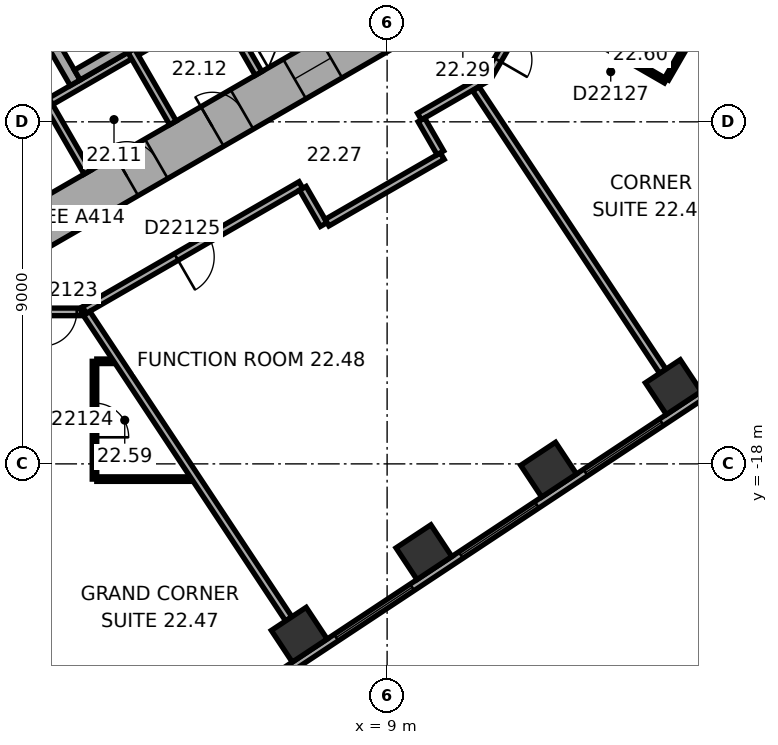
"""IFC4 building model, lengths in metres.
Left out: names, types, materials, properties, quantities, classifications, styles, units other than length and angle.
Written with IfcOpenShell. Run it as: python <this file> out.ifc"""

import sys

from ifc_helpers import new_model, si_unit, direction, frame, frame_2d, origin, origin_2d, place, context, subcontext, project, spatial, rectangle, extrude, element, fill, save


model = new_model("IFC4")
c1 = context("Model", 3, precision=1e-05, world=origin(), true_north=direction((0.0, 1.0)))
c2 = subcontext(c1, "Body", "Model", "MODEL_VIEW")
j1 = project(units=[si_unit("LENGTHUNIT", "METRE"), si_unit("PLANEANGLEUNIT", "RADIAN")], contexts=[c1])
p1 = place(None, origin())
s1 = spatial("IfcSite", under=j1, at=p1, CompositionType="ELEMENT")
p2 = place(p1, origin())
s2 = spatial("IfcBuilding", under=s1, at=p2, CompositionType="ELEMENT")
p3 = place(p2, frame((0.0, 0.0, 96.8)))
s3 = spatial("IfcBuildingStorey", under=s2, at=p3, CompositionType="ELEMENT", Elevation=96.8)
for number, where, z_axis, x_axis in (
    (1, (6.688, -22.496, 0.0), (0.0, 0.0, 1.0), (0.834, 0.552, 0.0)),
    (2, (9.969, -20.324, 0.0), (0.0, 0.0, 1.0), (0.834, 0.552, 0.0)),
    (3, (13.25, -18.152, 0.0), (0.0, 0.0, 1.0), (0.834, 0.552, 0.0)),
    (4, (16.531, -15.981, 0.0), (0.0, 0.0, 1.0), (0.834, 0.552, 0.0)),
):
    element("IfcColumn", number, at=place(p3, frame(where, z_axis=z_axis, x_axis=x_axis)), inside=s3, PredefinedType="COLUMN", context=c2, shape_type="SweptSolid", body=[
        extrude(rectangle(XDim=1.1, YDim=1.0, at=origin_2d()), origin(), (0.0, 0.0, 1.0), 3.3),
    ])
p4 = place(p3, frame((-10.4, -5.658, 0.0), z_axis=(0.0, 0.0, 1.0), x_axis=(0.866021384402, -0.500006961711, 0.0)))
e5 = element("IfcWall", 5, at=p4, inside=s3, PredefinedType="SHEAR", context=c2, shape_type="SweptSolid", body=[
    extrude(rectangle(XDim=12.355, YDim=1.2, at=frame_2d((6.178, 0.0))), origin(), (0.0, 0.0, 1.0), 3.3),
])
p5 = place(p4, frame((6.378, 0.0, 0.0)))
e6 = element("IfcOpeningElement", 6, at=p5, cuts=e5, PredefinedType="OPENING", context=c2, shape_type="SweptSolid", body=[
    extrude(rectangle(XDim=1.5, YDim=2.1, at=frame_2d((0.75, 1.05))), frame((0.0, 0.61, 0.0), z_axis=(0.0, -1.0, 0.0), x_axis=(1.0, 0.0, 0.0)), (0.0, 0.0, 1.0), 1.22),
])
p6 = place(p4, frame((3.228, 0.0, 0.0)))
e7 = element("IfcOpeningElement", 7, at=p6, cuts=e5, PredefinedType="OPENING", context=c2, shape_type="SweptSolid", body=[
    extrude(rectangle(XDim=0.9, YDim=2.1, at=frame_2d((0.45, 1.05))), frame((0.0, 0.61, 0.0), z_axis=(0.0, -1.0, 0.0), x_axis=(1.0, 0.0, 0.0)), (0.0, 0.0, 1.0), 1.22),
])
p7 = place(p3, frame((-0.3, -11.836, 0.0), z_axis=(0.0, 0.0, 1.0), x_axis=(0.866021384402, 0.500006961711, 0.0)))
e8 = element("IfcWall", 8, at=p7, inside=s3, PredefinedType="SHEAR", context=c2, shape_type="SweptSolid", body=[
    extrude(rectangle(XDim=12.355, YDim=1.2, at=frame_2d((6.178, 0.0))), origin(), (0.0, 0.0, 1.0), 3.3),
])
p8 = place(p7, frame((2.828, 0.0, 0.0)))
e9 = element("IfcOpeningElement", 9, at=p8, cuts=e8, PredefinedType="OPENING", context=c2, shape_type="SweptSolid", body=[
    extrude(rectangle(XDim=0.9, YDim=2.1, at=frame_2d((0.45, 1.05))), frame((0.0, 0.61, 0.0), z_axis=(0.0, -1.0, 0.0), x_axis=(1.0, 0.0, 0.0)), (0.0, 0.0, 1.0), 1.22),
])
p9 = place(p7, frame((5.428, 0.0, 0.0)))
e10 = element("IfcOpeningElement", 10, at=p9, cuts=e8, PredefinedType="OPENING", context=c2, shape_type="SweptSolid", body=[
    extrude(rectangle(XDim=0.9, YDim=2.1, at=frame_2d((0.45, 1.05))), frame((0.0, 0.61, 0.0), z_axis=(0.0, -1.0, 0.0), x_axis=(1.0, 0.0, 0.0)), (0.0, 0.0, 1.0), 1.22),
])
p10 = place(p7, frame((7.928, 0.0, 0.0)))
e11 = element("IfcOpeningElement", 11, at=p10, cuts=e8, PredefinedType="OPENING", context=c2, shape_type="SweptSolid", body=[
    extrude(rectangle(XDim=1.1, YDim=2.1, at=frame_2d((0.55, 1.05))), frame((0.0, 0.61, 0.0), z_axis=(0.0, -1.0, 0.0), x_axis=(1.0, 0.0, 0.0)), (0.0, 0.0, 1.0), 1.22),
])
p11 = place(p3, frame((3.083, -25.601, 0.0), z_axis=(0.0, 0.0, 1.0), x_axis=(0.833884295743, 0.551939291329, 0.0)))
e12 = element("IfcWall", 12, at=p11, inside=s3, PredefinedType="STANDARD", context=c2, shape_type="SweptSolid", body=[
    extrude(rectangle(XDim=21.246, YDim=0.2, at=frame_2d((10.623, 0.0))), origin(), (0.0, 0.0, 1.0), 3.3),
])
p12 = place(p11, frame((1.553, 0.0, 0.8)))
e13 = element("IfcOpeningElement", 13, at=p12, cuts=e12, PredefinedType="OPENING", context=c2, shape_type="SweptSolid", body=[
    extrude(rectangle(XDim=2.4, YDim=1.7, at=frame_2d((1.2, 0.85))), frame((0.0, 0.11, 0.0), z_axis=(0.0, -1.0, 0.0), x_axis=(1.0, 0.0, 0.0)), (0.0, 0.0, 1.0), 0.22),
])
p13 = place(p11, frame((5.488, 0.0, 0.8)))
e14 = element("IfcOpeningElement", 14, at=p13, cuts=e12, PredefinedType="OPENING", context=c2, shape_type="SweptSolid", body=[
    extrude(rectangle(XDim=2.4, YDim=1.7, at=frame_2d((1.2, 0.85))), frame((0.0, 0.11, 0.0), z_axis=(0.0, -1.0, 0.0), x_axis=(1.0, 0.0, 0.0)), (0.0, 0.0, 1.0), 0.22),
])
p14 = place(p11, frame((9.422, 0.0, 0.8)))
e15 = element("IfcOpeningElement", 15, at=p14, cuts=e12, PredefinedType="OPENING", context=c2, shape_type="SweptSolid", body=[
    extrude(rectangle(XDim=2.4, YDim=1.7, at=frame_2d((1.2, 0.85))), frame((0.0, 0.11, 0.0), z_axis=(0.0, -1.0, 0.0), x_axis=(1.0, 0.0, 0.0)), (0.0, 0.0, 1.0), 0.22),
])
p15 = place(p11, frame((13.357, 0.0, 0.8)))
e16 = element("IfcOpeningElement", 16, at=p15, cuts=e12, PredefinedType="OPENING", context=c2, shape_type="SweptSolid", body=[
    extrude(rectangle(XDim=2.4, YDim=1.7, at=frame_2d((1.2, 0.85))), frame((0.0, 0.11, 0.0), z_axis=(0.0, -1.0, 0.0), x_axis=(1.0, 0.0, 0.0)), (0.0, 0.0, 1.0), 0.22),
])
p16 = place(p11, frame((17.291, 0.0, 0.8)))
e17 = element("IfcOpeningElement", 17, at=p16, cuts=e12, PredefinedType="OPENING", context=c2, shape_type="SweptSolid", body=[
    extrude(rectangle(XDim=2.4, YDim=1.7, at=frame_2d((1.2, 0.85))), frame((0.0, 0.11, 0.0), z_axis=(0.0, -1.0, 0.0), x_axis=(1.0, 0.0, 0.0)), (0.0, 0.0, 1.0), 0.22),
])
p17 = place(p3, frame((-0.024, -8.559, 0.0), z_axis=(0.0, 0.0, 1.0), x_axis=(0.866026010844, 0.49999894854, 0.0)))
e18 = element("IfcWall", 18, at=p17, inside=s3, PredefinedType="PARTITIONING", context=c2, shape_type="SweptSolid", body=[
    extrude(rectangle(XDim=8.0, YDim=0.2, at=frame_2d((4.0, 0.0))), origin(), (0.0, 0.0, 1.0), 3.05),
])
for number, where, z_axis, x_axis in (
    (19, (0.013, -8.422, 0.0), (0.0, 0.0, 1.0), (0.5, -0.866, 0.0)),
    (20, (2.264, -7.122, 0.0), (0.0, 0.0, 1.0), (0.5, -0.866, 0.0)),
    (21, (4.516, -5.822, 0.0), (0.0, 0.0, 1.0), (0.5, -0.866, 0.0)),
):
    element("IfcWall", number, at=place(p3, frame(where, z_axis=z_axis, x_axis=x_axis)), inside=s3, PredefinedType="PARTITIONING", context=c2, shape_type="SweptSolid", body=[
        extrude(rectangle(XDim=2.2, YDim=0.2, at=frame_2d((1.1, 0.0))), origin(), (0.0, 0.0, 1.0), 3.05),
    ])
p18 = place(p3, frame((-1.558, -3.902, 0.0), z_axis=(0.0, 0.0, 1.0), x_axis=(0.499977259774, -0.866038532462, 0.0)))
e22 = element("IfcWall", 22, at=p18, inside=s3, PredefinedType="SHEAR", context=c2, shape_type="SweptSolid", body=[
    extrude(rectangle(XDim=4.7, YDim=0.3, at=frame_2d((2.35, 0.0))), origin(), (0.0, 0.0, 1.0), 3.05),
])
p19 = place(p18, frame((0.8, 0.0, 0.0)))
e23 = element("IfcOpeningElement", 23, at=p19, cuts=e22, PredefinedType="OPENING", context=c2, shape_type="SweptSolid", body=[
    extrude(rectangle(XDim=1.2, YDim=2.1, at=frame_2d((0.6, 1.05))), frame((0.0, 0.16, 0.0), z_axis=(0.0, -1.0, 0.0), x_axis=(1.0, 0.0, 0.0)), (0.0, 0.0, 1.0), 0.32),
])
p20 = place(p3, frame((0.847, -7.767, 0.0), z_axis=(0.0, 0.0, 1.0), x_axis=(0.866027801685, 0.499995846692, 0.0)))
e24 = element("IfcWall", 24, at=p20, inside=s3, PredefinedType="SHEAR", context=c2, shape_type="SweptSolid", body=[
    extrude(rectangle(XDim=7.06, YDim=0.3, at=frame_2d((3.53, 0.0))), origin(), (0.0, 0.0, 1.0), 3.05),
])
p21 = place(p3, frame((-0.91, -14.001, 0.0), z_axis=(0.0, 0.0, 1.0), x_axis=(1.0, 0.0, 0.0)))
e25 = element("IfcWall", 25, at=p21, inside=s3, PredefinedType="PARTITIONING", context=c2, shape_type="SweptSolid", body=[
    extrude(rectangle(XDim=1.86, YDim=0.2, at=frame_2d((0.93, 0.0))), origin(), (0.0, 0.0, 1.0), 3.05),
])
p22 = place(p21, frame((0.842, 0.0, 0.0)))
e26 = element("IfcOpeningElement", 26, at=p22, cuts=e25, PredefinedType="OPENING", context=c2, shape_type="SweptSolid", body=[
    extrude(rectangle(XDim=0.9, YDim=2.1, at=frame_2d((0.45, 1.05))), frame((0.0, 0.11, 0.0), z_axis=(0.0, -1.0, 0.0), x_axis=(1.0, 0.0, 0.0)), (0.0, 0.0, 1.0), 0.22),
])
p23 = place(p3, frame((1.033, -13.953, 0.0), z_axis=(0.0, 0.0, 1.0), x_axis=(0.866017531406, 0.500013635111, 0.0)))
e27 = element("IfcWall", 27, at=p23, inside=s3, PredefinedType="PARTITIONING", context=c2, shape_type="SweptSolid", body=[
    extrude(rectangle(XDim=6.58, YDim=0.2, at=frame_2d((3.29, 0.0))), origin(), (0.0, 0.0, 1.0), 3.05),
])
p24 = place(p23, frame((2.79, 0.0, 0.0)))
e28 = element("IfcOpeningElement", 28, at=p24, cuts=e27, PredefinedType="OPENING", context=c2, shape_type="SweptSolid", body=[
    extrude(rectangle(XDim=1.0, YDim=2.1, at=frame_2d((0.5, 1.05))), frame((0.0, 0.11, 0.0), z_axis=(0.0, -1.0, 0.0), x_axis=(1.0, 0.0, 0.0)), (0.0, 0.0, 1.0), 0.22),
])
p25 = place(p3, frame((1.3, -18.401, 0.0), z_axis=(0.0, 0.0, 1.0), x_axis=(0.0, 1.0, 0.0)))
e29 = element("IfcWall", 29, at=p25, inside=s3, PredefinedType="PARTITIONING", context=c2, shape_type="SweptSolid", body=[
    extrude(rectangle(XDim=3.1, YDim=0.12, at=frame_2d((1.55, 0.0))), origin(), (0.0, 0.0, 1.0), 3.05),
])
p26 = place(p25, frame((1.1, 0.0, 0.0)))
e30 = element("IfcOpeningElement", 30, at=p26, cuts=e29, PredefinedType="OPENING", context=c2, shape_type="SweptSolid", body=[
    extrude(rectangle(XDim=0.9, YDim=2.1, at=frame_2d((0.45, 1.05))), frame((0.0, 0.07, 0.0), z_axis=(0.0, -1.0, 0.0), x_axis=(1.0, 0.0, 0.0)), (0.0, 0.0, 1.0), 0.14),
])
p27 = place(p3, frame((1.36, -15.301, 0.0), z_axis=(0.0, 0.0, 1.0), x_axis=(1.0, 0.0, 0.0)))
e31 = element("IfcWall", 31, at=p27, inside=s3, PredefinedType="PARTITIONING", context=c2, shape_type="SweptSolid", body=[
    extrude(rectangle(XDim=0.416, YDim=0.12, at=frame_2d((0.208, 0.0))), origin(), (0.0, 0.0, 1.0), 3.05),
])
p28 = place(p3, frame((3.828, -18.401, 0.0), z_axis=(0.0, 0.0, 1.0), x_axis=(-1.0, 0.0, 0.0)))
e32 = element("IfcWall", 32, at=p28, inside=s3, PredefinedType="PARTITIONING", context=c2, shape_type="SweptSolid", body=[
    extrude(rectangle(XDim=2.468, YDim=0.12, at=frame_2d((1.234, 0.0))), origin(), (0.0, 0.0, 1.0), 3.05),
])
p29 = place(p3, frame((6.412, -22.079, 0.0), z_axis=(0.0, 0.0, 1.0), x_axis=(-0.551919507115, 0.83389739037, 0.0)))
e33 = element("IfcWall", 33, at=p29, inside=s3, PredefinedType="PARTITIONING", context=c2, shape_type="SweptSolid", body=[
    extrude(rectangle(XDim=9.635, YDim=0.2, at=frame_2d((4.817, 0.0))), origin(), (0.0, 0.0, 1.0), 3.05),
])
p30 = place(p3, frame((6.782, -10.749, 0.0), z_axis=(0.0, 0.0, 1.0), x_axis=(0.500074377092, -0.865982457891, 0.0)))
e34 = element("IfcWall", 34, at=p30, inside=s3, PredefinedType="PARTITIONING", context=c2, shape_type="SweptSolid", body=[
    extrude(rectangle(XDim=1.101, YDim=0.2, at=frame_2d((0.55, 0.0))), origin(), (0.0, 0.0, 1.0), 3.05),
])
p31 = place(p3, frame((7.419, -11.653, 0.0), z_axis=(0.0, 0.0, 1.0), x_axis=(0.866038154057, 0.49997791523, 0.0)))
e35 = element("IfcWall", 35, at=p31, inside=s3, PredefinedType="PARTITIONING", context=c2, shape_type="SweptSolid", body=[
    extrude(rectangle(XDim=3.502, YDim=0.2, at=frame_2d((1.751, 0.0))), origin(), (0.0, 0.0, 1.0), 3.05),
])
p32 = place(p3, frame((9.852, -8.861, 0.0), z_axis=(0.0, 0.0, 1.0), x_axis=(0.866013291437, 0.500020978615, 0.0)))
e36 = element("IfcWall", 36, at=p32, inside=s3, PredefinedType="PARTITIONING", context=c2, shape_type="SweptSolid", body=[
    extrude(rectangle(XDim=2.077, YDim=0.2, at=frame_2d((1.038, 0.0))), origin(), (0.0, 0.0, 1.0), 3.05),
])
p33 = place(p3, frame((10.402, -9.815, 0.0), z_axis=(0.0, 0.0, 1.0), x_axis=(-0.499968756647, 0.866043441391, 0.0)))
e37 = element("IfcWall", 37, at=p33, inside=s3, PredefinedType="PARTITIONING", context=c2, shape_type="SweptSolid", body=[
    extrude(rectangle(XDim=1.001, YDim=0.2, at=frame_2d((0.5, 0.0))), origin(), (0.0, 0.0, 1.0), 3.05),
])
p34 = place(p3, frame((11.67, -7.788, 0.0), z_axis=(0.0, 0.0, 1.0), x_axis=(0.500063286585, 0.865988862174, 0.0)))
e38 = element("IfcWall", 38, at=p34, inside=s3, PredefinedType="PARTITIONING", context=c2, shape_type="SweptSolid", body=[
    extrude(rectangle(XDim=1.86, YDim=0.2, at=frame_2d((0.93, 0.0))), origin(), (0.0, 0.0, 1.0), 3.05),
])
p35 = place(p34, frame((0.48, 0.0, 0.0)))
e39 = element("IfcOpeningElement", 39, at=p35, cuts=e38, PredefinedType="OPENING", context=c2, shape_type="SweptSolid", body=[
    extrude(rectangle(XDim=0.9, YDim=2.1, at=frame_2d((0.45, 1.05))), frame((0.0, 0.11, 0.0), z_axis=(0.0, -1.0, 0.0), x_axis=(1.0, 0.0, 0.0)), (0.0, 0.0, 1.0), 0.22),
])
p36 = place(p3, frame((16.255, -15.564, 0.0), z_axis=(0.0, 0.0, 1.0), x_axis=(-0.55192208744, 0.833895682562, 0.0)))
e40 = element("IfcWall", 40, at=p36, inside=s3, PredefinedType="PARTITIONING", context=c2, shape_type="SweptSolid", body=[
    extrude(rectangle(XDim=8.913, YDim=0.2, at=frame_2d((4.457, 0.0))), origin(), (0.0, 0.0, 1.0), 2.6),
])
p37 = place(p3, frame((16.326, -7.925, 0.0), z_axis=(0.0, 0.0, 1.0), x_axis=(-0.865997131366, 0.500048966069, 0.0)))
e41 = element("IfcWall", 41, at=p37, inside=s3, PredefinedType="PARTITIONING", context=c2, shape_type="SweptSolid", body=[
    extrude(rectangle(XDim=2.74, YDim=0.12, at=frame_2d((1.37, 0.0))), origin(), (0.0, 0.0, 1.0), 3.05),
])
p38 = place(p37, frame((0.92, 0.0, 0.0)))
e42 = element("IfcOpeningElement", 42, at=p38, cuts=e41, PredefinedType="OPENING", context=c2, shape_type="SweptSolid", body=[
    extrude(rectangle(XDim=0.9, YDim=2.1, at=frame_2d((0.45, 1.05))), frame((0.0, 0.07, 0.0), z_axis=(0.0, -1.0, 0.0), x_axis=(1.0, 0.0, 0.0)), (0.0, 0.0, 1.0), 0.14),
])
p39 = place(p3, frame((17.396, -6.071, 0.0), z_axis=(0.0, 0.0, 1.0), x_axis=(-0.500027264788, -0.866009661879, 0.0)))
e43 = element("IfcWall", 43, at=p39, inside=s3, PredefinedType="PARTITIONING", context=c2, shape_type="SweptSolid", body=[
    extrude(rectangle(XDim=2.08, YDim=0.12, at=frame_2d((1.04, 0.0))), origin(), (0.0, 0.0, 1.0), 3.05),
])
p40 = place(p13, origin())
e44 = element("IfcWindow", 44, at=p40, inside=s3, PartitioningType="SINGLE_PANEL", PredefinedType="WINDOW", context=c2, shape_type="SweptSolid", body=[
    extrude(rectangle(XDim=2.4, YDim=1.7, at=frame_2d((1.2, 0.85))), frame((0.0, 0.03, 0.0), z_axis=(0.0, -1.0, 0.0), x_axis=(1.0, 0.0, 0.0)), (0.0, 0.0, 1.0), 0.06),
])
fill(e14, e44)
p41 = place(p14, origin())
e45 = element("IfcWindow", 45, at=p41, inside=s3, PartitioningType="SINGLE_PANEL", PredefinedType="WINDOW", context=c2, shape_type="SweptSolid", body=[
    extrude(rectangle(XDim=2.4, YDim=1.7, at=frame_2d((1.2, 0.85))), frame((0.0, 0.03, 0.0), z_axis=(0.0, -1.0, 0.0), x_axis=(1.0, 0.0, 0.0)), (0.0, 0.0, 1.0), 0.06),
])
fill(e15, e45)
p42 = place(p15, origin())
e46 = element("IfcWindow", 46, at=p42, inside=s3, PartitioningType="SINGLE_PANEL", PredefinedType="WINDOW", context=c2, shape_type="SweptSolid", body=[
    extrude(rectangle(XDim=2.4, YDim=1.7, at=frame_2d((1.2, 0.85))), frame((0.0, 0.03, 0.0), z_axis=(0.0, -1.0, 0.0), x_axis=(1.0, 0.0, 0.0)), (0.0, 0.0, 1.0), 0.06),
])
fill(e16, e46)
p43 = place(p8, origin())
e47 = element("IfcDoor", 47, at=p43, inside=s3, OperationType="SINGLE_SWING_LEFT", PredefinedType="DOOR", context=c2, shape_type="SweptSolid", body=[
    extrude(rectangle(XDim=0.9, YDim=2.1, at=frame_2d((0.45, 1.05))), frame((0.0, 0.025, 0.0), z_axis=(0.0, -1.0, 0.0), x_axis=(1.0, 0.0, 0.0)), (0.0, 0.0, 1.0), 0.05),
])
fill(e9, e47)
p44 = place(p9, origin())
e48 = element("IfcDoor", 48, at=p44, inside=s3, OperationType="SINGLE_SWING_LEFT", PredefinedType="DOOR", context=c2, shape_type="SweptSolid", body=[
    extrude(rectangle(XDim=0.9, YDim=2.1, at=frame_2d((0.45, 1.05))), frame((0.0, 0.025, 0.0), z_axis=(0.0, -1.0, 0.0), x_axis=(1.0, 0.0, 0.0)), (0.0, 0.0, 1.0), 0.05),
])
fill(e10, e48)
p45 = place(p10, origin())
e49 = element("IfcDoor", 49, at=p45, inside=s3, OperationType="DOUBLE_DOOR_SLIDING", PredefinedType="DOOR", context=c2, shape_type="SweptSolid", body=[
    extrude(rectangle(XDim=1.1, YDim=2.1, at=frame_2d((0.55, 1.05))), frame((0.0, 0.025, 0.0), z_axis=(0.0, -1.0, 0.0), x_axis=(1.0, 0.0, 0.0)), (0.0, 0.0, 1.0), 0.05),
])
fill(e11, e49)
p46 = place(p22, origin())
e50 = element("IfcDoor", 50, at=p46, inside=s3, OperationType="SINGLE_SWING_LEFT", PredefinedType="DOOR", context=c2, shape_type="SweptSolid", body=[
    extrude(rectangle(XDim=0.9, YDim=2.1, at=frame_2d((0.45, 1.05))), frame((0.0, 0.025, 0.0), z_axis=(0.0, -1.0, 0.0), x_axis=(1.0, 0.0, 0.0)), (0.0, 0.0, 1.0), 0.05),
])
fill(e26, e50)
p47 = place(p26, origin())
e51 = element("IfcDoor", 51, at=p47, inside=s3, OperationType="SINGLE_SWING_LEFT", PredefinedType="DOOR", context=c2, shape_type="SweptSolid", body=[
    extrude(rectangle(XDim=0.9, YDim=2.1, at=frame_2d((0.45, 1.05))), frame((0.0, 0.025, 0.0), z_axis=(0.0, -1.0, 0.0), x_axis=(1.0, 0.0, 0.0)), (0.0, 0.0, 1.0), 0.05),
])
fill(e30, e51)
p48 = place(p24, origin())
e52 = element("IfcDoor", 52, at=p48, inside=s3, OperationType="SINGLE_SWING_LEFT", PredefinedType="DOOR", context=c2, shape_type="SweptSolid", body=[
    extrude(rectangle(XDim=1.0, YDim=2.1, at=frame_2d((0.5, 1.05))), frame((0.0, 0.025, 0.0), z_axis=(0.0, -1.0, 0.0), x_axis=(1.0, 0.0, 0.0)), (0.0, 0.0, 1.0), 0.05),
])
fill(e28, e52)
p49 = place(p35, origin())
e53 = element("IfcDoor", 53, at=p49, inside=s3, OperationType="SINGLE_SWING_LEFT", PredefinedType="DOOR", context=c2, shape_type="SweptSolid", body=[
    extrude(rectangle(XDim=0.9, YDim=2.1, at=frame_2d((0.45, 1.05))), frame((0.0, 0.025, 0.0), z_axis=(0.0, -1.0, 0.0), x_axis=(1.0, 0.0, 0.0)), (0.0, 0.0, 1.0), 0.05),
])
fill(e39, e53)
p50 = place(p38, origin())
e54 = element("IfcDoor", 54, at=p50, inside=s3, OperationType="SINGLE_SWING_LEFT", PredefinedType="DOOR", context=c2, shape_type="SweptSolid", body=[
    extrude(rectangle(XDim=0.9, YDim=2.1, at=frame_2d((0.45, 1.05))), frame((0.0, 0.025, 0.0), z_axis=(0.0, -1.0, 0.0), x_axis=(1.0, 0.0, 0.0)), (0.0, 0.0, 1.0), 0.05),
])
fill(e42, e54)
save(model, sys.argv[1])
